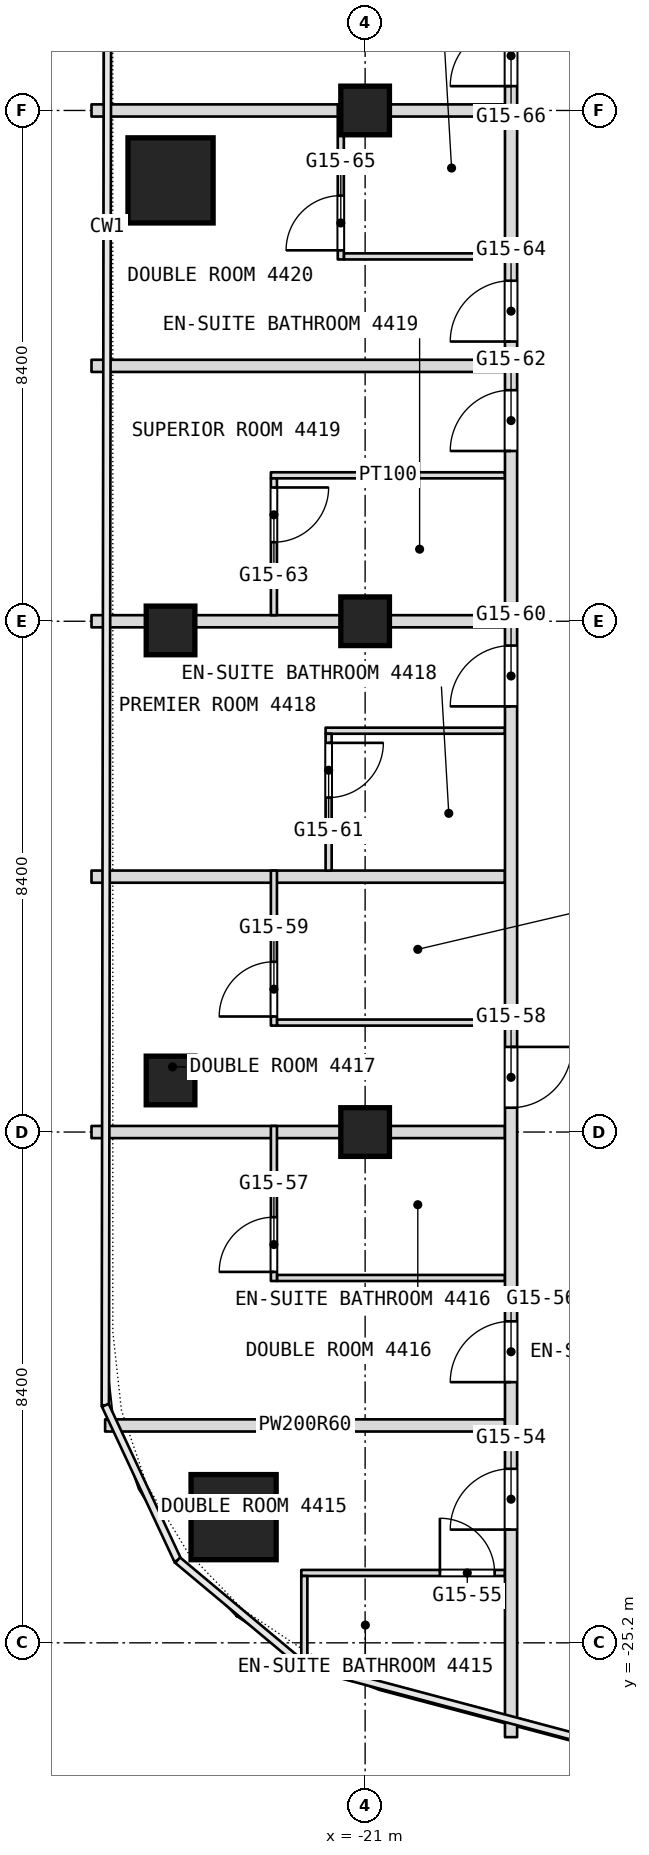
"""IFC4 building model, lengths in metres.
Left out: names, types, materials, properties, quantities, classifications, styles, units other than length and angle.
Written with IfcOpenShell. Run it as: python <this file> out.ifc"""

import sys

from ifc_helpers import new_model, si_unit, direction, frame, frame_2d, origin, origin_2d, place, context, subcontext, project, spatial, rectangle, extrude, element, fill, save


model = new_model("IFC4")
c1 = context("Model", 3, precision=1e-05, world=origin(), true_north=direction((0.0, 1.0)))
c2 = subcontext(c1, "Body", "Model", "MODEL_VIEW")
j1 = project(units=[si_unit("LENGTHUNIT", "METRE"), si_unit("PLANEANGLEUNIT", "RADIAN")], contexts=[c1])
p1 = place(None, origin())
s1 = spatial("IfcSite", under=j1, at=p1, CompositionType="ELEMENT")
p2 = place(p1, origin())
s2 = spatial("IfcBuilding", under=s1, at=p2, CompositionType="ELEMENT")
p3 = place(p2, frame((0.0, 0.0, 194.9)))
s3 = spatial("IfcBuildingStorey", under=s2, at=p3, CompositionType="ELEMENT", Elevation=194.9)
for number, where, z_axis, x_axis in (
    (1, (-23.163, -23.133, 0.0), (0.0, 0.0, 1.0), (1.0, 0.0, 0.0)),
    (2, (-24.2, -1.15, 0.0), (0.0, 0.0, 1.0), (1.0, 0.0, 0.0)),
):
    element("IfcColumn", number, at=place(p3, frame(where, z_axis=z_axis, x_axis=x_axis)), inside=s3, PredefinedType="COLUMN", context=c2, shape_type="SweptSolid", body=[
        extrude(rectangle(XDim=1.4, YDim=1.4, at=origin_2d()), origin(), (0.0, 0.0, 1.0), 3.6),
    ])
for number, where, z_axis, x_axis in (
    (3, (-21.0, -16.8, 0.0), (0.0, 0.0, 1.0), (1.0, 0.0, 0.0)),
    (4, (-21.0, -8.4, 0.0), (0.0, 0.0, 1.0), (1.0, 0.0, 0.0)),
    (5, (-21.0, 0.0, 0.0), (0.0, 0.0, 1.0), (1.0, 0.0, 0.0)),
    (6, (-24.2, -15.952, 0.0), (0.0, 0.0, 1.0), (1.0, 0.0, 0.0)),
    (7, (-24.2, -8.551, 0.0), (0.0, 0.0, 1.0), (1.0, 0.0, 0.0)),
):
    element("IfcColumn", number, at=place(p3, frame(where, z_axis=z_axis, x_axis=x_axis)), inside=s3, PredefinedType="COLUMN", context=c2, shape_type="SweptSolid", body=[
        extrude(rectangle(XDim=0.8, YDim=0.8, at=origin_2d()), origin(), (0.0, 0.0, 1.0), 3.6),
    ])
p4 = place(p3, frame((-22.05, -24.051, 0.0), z_axis=(0.0, 0.0, 1.0), x_axis=(1.0, 0.0, 0.0)))
e8 = element("IfcWall", 8, at=p4, inside=s3, PredefinedType="PARTITIONING", context=c2, shape_type="SweptSolid", body=[
    extrude(rectangle(XDim=3.35, YDim=0.1, at=frame_2d((1.675, 0.0))), origin(), (0.0, 0.0, 1.0), 3.34),
])
p5 = place(p4, frame((2.28, 0.0, 0.0)))
e9 = element("IfcOpeningElement", 9, at=p5, cuts=e8, PredefinedType="OPENING", context=c2, shape_type="SweptSolid", body=[
    extrude(rectangle(XDim=0.9, YDim=2.1, at=frame_2d((0.45, 1.05))), frame((0.0, 0.05, 0.0), z_axis=(0.0, -1.0, 0.0), x_axis=(1.0, 0.0, 0.0)), (0.0, 0.0, 1.0), 0.1),
])
p6 = place(p3, frame((-25.276, -21.625, 0.0), z_axis=(0.0, 0.0, 1.0), x_axis=(1.0, 0.0, 0.0)))
e10 = element("IfcWall", 10, at=p6, inside=s3, PredefinedType="PARTITIONING", context=c2, shape_type="SweptSolid", body=[
    extrude(rectangle(XDim=6.576, YDim=0.2, at=frame_2d((3.288, 0.0))), origin(), (0.0, 0.0, 1.0), 3.34),
])
p7 = place(p3, frame((-22.45, -19.2, 0.0), z_axis=(0.0, 0.0, 1.0), x_axis=(1.0, 0.0, 0.0)))
e11 = element("IfcWall", 11, at=p7, inside=s3, PredefinedType="PARTITIONING", context=c2, shape_type="SweptSolid", body=[
    extrude(rectangle(XDim=3.75, YDim=0.1, at=frame_2d((1.875, 0.0))), origin(), (0.0, 0.0, 1.0), 3.34),
])
p8 = place(p3, frame((-25.5, -16.8, 0.0), z_axis=(0.0, 0.0, 1.0), x_axis=(1.0, 0.0, 0.0)))
e12 = element("IfcWall", 12, at=p8, inside=s3, PredefinedType="PARTITIONING", context=c2, shape_type="SweptSolid", body=[
    extrude(rectangle(XDim=6.8, YDim=0.2, at=frame_2d((3.4, 0.0))), origin(), (0.0, 0.0, 1.0), 2.94),
])
p9 = place(p3, frame((-22.45, -15.0, 0.0), z_axis=(0.0, 0.0, 1.0), x_axis=(1.0, 0.0, 0.0)))
e13 = element("IfcWall", 13, at=p9, inside=s3, PredefinedType="PARTITIONING", context=c2, shape_type="SweptSolid", body=[
    extrude(rectangle(XDim=3.75, YDim=0.1, at=frame_2d((1.875, 0.0))), origin(), (0.0, 0.0, 1.0), 3.34),
])
p10 = place(p3, frame((-25.5, -12.6, 0.0), z_axis=(0.0, 0.0, 1.0), x_axis=(1.0, 0.0, 0.0)))
e14 = element("IfcWall", 14, at=p10, inside=s3, PredefinedType="PARTITIONING", context=c2, shape_type="SweptSolid", body=[
    extrude(rectangle(XDim=6.8, YDim=0.2, at=frame_2d((3.4, 0.0))), origin(), (0.0, 0.0, 1.0), 3.34),
])
p11 = place(p3, frame((-21.65, -10.2, 0.0), z_axis=(0.0, 0.0, 1.0), x_axis=(1.0, 0.0, 0.0)))
e15 = element("IfcWall", 15, at=p11, inside=s3, PredefinedType="PARTITIONING", context=c2, shape_type="SweptSolid", body=[
    extrude(rectangle(XDim=2.95, YDim=0.1, at=frame_2d((1.475, 0.0))), origin(), (0.0, 0.0, 1.0), 3.34),
])
p12 = place(p3, frame((-25.5, -8.4, 0.0), z_axis=(0.0, 0.0, 1.0), x_axis=(1.0, 0.0, 0.0)))
e16 = element("IfcWall", 16, at=p12, inside=s3, PredefinedType="PARTITIONING", context=c2, shape_type="SweptSolid", body=[
    extrude(rectangle(XDim=6.8, YDim=0.2, at=frame_2d((3.4, 0.0))), origin(), (0.0, 0.0, 1.0), 2.94),
])
p13 = place(p3, frame((-22.55, -6.0, 0.0), z_axis=(0.0, 0.0, 1.0), x_axis=(1.0, 0.0, 0.0)))
e17 = element("IfcWall", 17, at=p13, inside=s3, PredefinedType="PARTITIONING", context=c2, shape_type="SweptSolid", body=[
    extrude(rectangle(XDim=3.85, YDim=0.1, at=frame_2d((1.925, 0.0))), origin(), (0.0, 0.0, 1.0), 3.34),
])
p14 = place(p3, frame((-25.5, -4.2, 0.0), z_axis=(0.0, 0.0, 1.0), x_axis=(1.0, 0.0, 0.0)))
e18 = element("IfcWall", 18, at=p14, inside=s3, PredefinedType="PARTITIONING", context=c2, shape_type="SweptSolid", body=[
    extrude(rectangle(XDim=6.8, YDim=0.2, at=frame_2d((3.4, 0.0))), origin(), (0.0, 0.0, 1.0), 3.34),
])
p15 = place(p3, frame((-21.35, -2.4, 0.0), z_axis=(0.0, 0.0, 1.0), x_axis=(1.0, 0.0, 0.0)))
e19 = element("IfcWall", 19, at=p15, inside=s3, PredefinedType="PARTITIONING", context=c2, shape_type="SweptSolid", body=[
    extrude(rectangle(XDim=2.65, YDim=0.1, at=frame_2d((1.325, 0.0))), origin(), (0.0, 0.0, 1.0), 3.34),
])
p16 = place(p3, frame((-25.5, 0.0, 0.0), z_axis=(0.0, 0.0, 1.0), x_axis=(1.0, 0.0, 0.0)))
e20 = element("IfcWall", 20, at=p16, inside=s3, PredefinedType="PARTITIONING", context=c2, shape_type="SweptSolid", body=[
    extrude(rectangle(XDim=6.8, YDim=0.2, at=frame_2d((3.4, 0.0))), origin(), (0.0, 0.0, 1.0), 2.94),
])
p17 = place(p3, frame((-18.6, -26.751, 0.0), z_axis=(0.0, 0.0, 1.0), x_axis=(0.0, 1.0, 0.0)))
e21 = element("IfcWall", 21, at=p17, inside=s3, PredefinedType="PARTITIONING", context=c2, shape_type="SweptSolid", body=[
    extrude(rectangle(XDim=49.091, YDim=0.2, at=frame_2d((24.545, 0.0))), origin(), (0.0, 0.0, 1.0), 3.34),
])
p18 = place(p17, frame((3.413, 0.0, 0.0)))
e22 = element("IfcOpeningElement", 22, at=p18, cuts=e21, PredefinedType="OPENING", context=c2, shape_type="SweptSolid", body=[
    extrude(rectangle(XDim=1.0, YDim=2.1, at=frame_2d((0.5, 1.05))), frame((0.0, 0.1, 0.0), z_axis=(0.0, -1.0, 0.0), x_axis=(1.0, 0.0, 0.0)), (0.0, 0.0, 1.0), 0.2),
])
p19 = place(p17, frame((5.838, 0.0, 0.0)))
e23 = element("IfcOpeningElement", 23, at=p19, cuts=e21, PredefinedType="OPENING", context=c2, shape_type="SweptSolid", body=[
    extrude(rectangle(XDim=1.0, YDim=2.1, at=frame_2d((0.5, 1.05))), frame((0.0, 0.1, 0.0), z_axis=(0.0, -1.0, 0.0), x_axis=(1.0, 0.0, 0.0)), (0.0, 0.0, 1.0), 0.2),
])
p20 = place(p17, frame((10.351, 0.0, 0.0)))
e24 = element("IfcOpeningElement", 24, at=p20, cuts=e21, PredefinedType="OPENING", context=c2, shape_type="SweptSolid", body=[
    extrude(rectangle(XDim=1.0, YDim=2.1, at=frame_2d((0.5, 1.05))), frame((0.0, 0.1, 0.0), z_axis=(0.0, -1.0, 0.0), x_axis=(1.0, 0.0, 0.0)), (0.0, 0.0, 1.0), 0.2),
])
p21 = place(p17, frame((16.951, 0.0, 0.0)))
e25 = element("IfcOpeningElement", 25, at=p21, cuts=e21, PredefinedType="OPENING", context=c2, shape_type="SweptSolid", body=[
    extrude(rectangle(XDim=1.0, YDim=2.1, at=frame_2d((0.5, 1.05))), frame((0.0, 0.1, 0.0), z_axis=(0.0, -1.0, 0.0), x_axis=(1.0, 0.0, 0.0)), (0.0, 0.0, 1.0), 0.2),
])
p22 = place(p17, frame((21.151, 0.0, 0.0)))
e26 = element("IfcOpeningElement", 26, at=p22, cuts=e21, PredefinedType="OPENING", context=c2, shape_type="SweptSolid", body=[
    extrude(rectangle(XDim=1.0, YDim=2.1, at=frame_2d((0.5, 1.05))), frame((0.0, 0.1, 0.0), z_axis=(0.0, -1.0, 0.0), x_axis=(1.0, 0.0, 0.0)), (0.0, 0.0, 1.0), 0.2),
])
p23 = place(p17, frame((22.951, 0.0, 0.0)))
e27 = element("IfcOpeningElement", 27, at=p23, cuts=e21, PredefinedType="OPENING", context=c2, shape_type="SweptSolid", body=[
    extrude(rectangle(XDim=1.0, YDim=2.1, at=frame_2d((0.5, 1.05))), frame((0.0, 0.1, 0.0), z_axis=(0.0, -1.0, 0.0), x_axis=(1.0, 0.0, 0.0)), (0.0, 0.0, 1.0), 0.2),
])
p24 = place(p17, frame((27.151, 0.0, 0.0)))
e28 = element("IfcOpeningElement", 28, at=p24, cuts=e21, PredefinedType="OPENING", context=c2, shape_type="SweptSolid", body=[
    extrude(rectangle(XDim=1.0, YDim=2.1, at=frame_2d((0.5, 1.05))), frame((0.0, 0.1, 0.0), z_axis=(0.0, -1.0, 0.0), x_axis=(1.0, 0.0, 0.0)), (0.0, 0.0, 1.0), 0.2),
])
p25 = place(p17, frame((33.751, 0.0, 0.0)))
e29 = element("IfcOpeningElement", 29, at=p25, cuts=e21, PredefinedType="OPENING", context=c2, shape_type="SweptSolid", body=[
    extrude(rectangle(XDim=1.0, YDim=2.1, at=frame_2d((0.5, 1.05))), frame((0.0, 0.1, 0.0), z_axis=(0.0, -1.0, 0.0), x_axis=(1.0, 0.0, 0.0)), (0.0, 0.0, 1.0), 0.2),
])
p26 = place(p17, frame((37.951, 0.0, 0.0)))
e30 = element("IfcOpeningElement", 30, at=p26, cuts=e21, PredefinedType="OPENING", context=c2, shape_type="SweptSolid", body=[
    extrude(rectangle(XDim=1.0, YDim=2.1, at=frame_2d((0.5, 1.05))), frame((0.0, 0.1, 0.0), z_axis=(0.0, -1.0, 0.0), x_axis=(1.0, 0.0, 0.0)), (0.0, 0.0, 1.0), 0.2),
])
p27 = place(p17, frame((39.751, 0.0, 0.0)))
e31 = element("IfcOpeningElement", 31, at=p27, cuts=e21, PredefinedType="OPENING", context=c2, shape_type="SweptSolid", body=[
    extrude(rectangle(XDim=1.0, YDim=2.1, at=frame_2d((0.5, 1.05))), frame((0.0, 0.1, 0.0), z_axis=(0.0, -1.0, 0.0), x_axis=(1.0, 0.0, 0.0)), (0.0, 0.0, 1.0), 0.2),
])
p28 = place(p17, frame((44.051, 0.0, 0.0)))
e32 = element("IfcOpeningElement", 32, at=p28, cuts=e21, PredefinedType="OPENING", context=c2, shape_type="SweptSolid", body=[
    extrude(rectangle(XDim=1.0, YDim=2.1, at=frame_2d((0.5, 1.05))), frame((0.0, 0.1, 0.0), z_axis=(0.0, -1.0, 0.0), x_axis=(1.0, 0.0, 0.0)), (0.0, 0.0, 1.0), 0.2),
])
p29 = place(p3, frame((-21.4, -2.45, 0.0), z_axis=(0.0, 0.0, 1.0), x_axis=(0.0, 1.0, 0.0)))
e33 = element("IfcWall", 33, at=p29, inside=s3, PredefinedType="PARTITIONING", context=c2, shape_type="SweptSolid", body=[
    extrude(rectangle(XDim=2.55, YDim=0.1, at=frame_2d((1.275, 0.0))), origin(), (0.0, 0.0, 1.0), 3.34),
])
p30 = place(p29, frame((0.15, 0.0, 0.0)))
e34 = element("IfcOpeningElement", 34, at=p30, cuts=e33, PredefinedType="OPENING", context=c2, shape_type="SweptSolid", body=[
    extrude(rectangle(XDim=0.9, YDim=2.1, at=frame_2d((0.45, 1.05))), frame((0.0, 0.05, 0.0), z_axis=(0.0, -1.0, 0.0), x_axis=(1.0, 0.0, 0.0)), (0.0, 0.0, 1.0), 0.1),
])
p31 = place(p3, frame((-21.6, -12.5, 0.0), z_axis=(0.0, 0.0, 1.0), x_axis=(0.0, 1.0, 0.0)))
e35 = element("IfcWall", 35, at=p31, inside=s3, PredefinedType="PARTITIONING", context=c2, shape_type="SweptSolid", body=[
    extrude(rectangle(XDim=2.25, YDim=0.1, at=frame_2d((1.125, 0.0))), origin(), (0.0, 0.0, 1.0), 3.34),
])
p32 = place(p31, frame((1.2, 0.0, 0.0)))
e36 = element("IfcOpeningElement", 36, at=p32, cuts=e35, PredefinedType="OPENING", context=c2, shape_type="SweptSolid", body=[
    extrude(rectangle(XDim=0.9, YDim=2.1, at=frame_2d((0.45, 1.05))), frame((0.0, 0.05, 0.0), z_axis=(0.0, -1.0, 0.0), x_axis=(1.0, 0.0, 0.0)), (0.0, 0.0, 1.0), 0.1),
])
p33 = place(p3, frame((-22.0, -25.685, 0.0), z_axis=(0.0, 0.0, 1.0), x_axis=(0.0, 1.0, 0.0)))
e37 = element("IfcWall", 37, at=p33, inside=s3, PredefinedType="PARTITIONING", context=c2, shape_type="SweptSolid", body=[
    extrude(rectangle(XDim=1.584, YDim=0.1, at=frame_2d((0.792, 0.0))), origin(), (0.0, 0.0, 1.0), 3.34),
])
p34 = place(p3, frame((-22.5, -19.25, 0.0), z_axis=(0.0, 0.0, 1.0), x_axis=(0.0, 1.0, 0.0)))
e38 = element("IfcWall", 38, at=p34, inside=s3, PredefinedType="PARTITIONING", context=c2, shape_type="SweptSolid", body=[
    extrude(rectangle(XDim=2.55, YDim=0.1, at=frame_2d((1.275, 0.0))), origin(), (0.0, 0.0, 1.0), 3.34),
])
p35 = place(p34, frame((0.15, 0.0, 0.0)))
e39 = element("IfcOpeningElement", 39, at=p35, cuts=e38, PredefinedType="OPENING", context=c2, shape_type="SweptSolid", body=[
    extrude(rectangle(XDim=0.9, YDim=2.1, at=frame_2d((0.45, 1.05))), frame((0.0, 0.05, 0.0), z_axis=(0.0, -1.0, 0.0), x_axis=(1.0, 0.0, 0.0)), (0.0, 0.0, 1.0), 0.1),
])
p36 = place(p3, frame((-22.5, -15.05, 0.0), z_axis=(0.0, 0.0, 1.0), x_axis=(0.0, 1.0, 0.0)))
e40 = element("IfcWall", 40, at=p36, inside=s3, PredefinedType="PARTITIONING", context=c2, shape_type="SweptSolid", body=[
    extrude(rectangle(XDim=2.55, YDim=0.1, at=frame_2d((1.275, 0.0))), origin(), (0.0, 0.0, 1.0), 3.34),
])
p37 = place(p36, frame((0.15, 0.0, 0.0)))
e41 = element("IfcOpeningElement", 41, at=p37, cuts=e40, PredefinedType="OPENING", context=c2, shape_type="SweptSolid", body=[
    extrude(rectangle(XDim=0.9, YDim=2.1, at=frame_2d((0.45, 1.05))), frame((0.0, 0.05, 0.0), z_axis=(0.0, -1.0, 0.0), x_axis=(1.0, 0.0, 0.0)), (0.0, 0.0, 1.0), 0.1),
])
p38 = place(p3, frame((-22.5, -8.3, 0.0), z_axis=(0.0, 0.0, 1.0), x_axis=(0.0, 1.0, 0.0)))
e42 = element("IfcWall", 42, at=p38, inside=s3, PredefinedType="PARTITIONING", context=c2, shape_type="SweptSolid", body=[
    extrude(rectangle(XDim=2.25, YDim=0.1, at=frame_2d((1.125, 0.0))), origin(), (0.0, 0.0, 1.0), 3.34),
])
p39 = place(p38, frame((1.2, 0.0, 0.0)))
e43 = element("IfcOpeningElement", 43, at=p39, cuts=e42, PredefinedType="OPENING", context=c2, shape_type="SweptSolid", body=[
    extrude(rectangle(XDim=0.9, YDim=2.1, at=frame_2d((0.45, 1.05))), frame((0.0, 0.05, 0.0), z_axis=(0.0, -1.0, 0.0), x_axis=(1.0, 0.0, 0.0)), (0.0, 0.0, 1.0), 0.1),
])
p40 = place(p5, origin())
e44 = element("IfcDoor", 44, at=p40, inside=s3, OperationType="SINGLE_SWING_LEFT", PredefinedType="DOOR", context=c2, shape_type="SweptSolid", body=[
    extrude(rectangle(XDim=0.9, YDim=2.1, at=frame_2d((0.45, 1.05))), frame((0.0, 0.025, 0.0), z_axis=(0.0, -1.0, 0.0), x_axis=(1.0, 0.0, 0.0)), (0.0, 0.0, 1.0), 0.05),
])
fill(e9, e44)
p41 = place(p18, origin())
e45 = element("IfcDoor", 45, at=p41, inside=s3, OperationType="SINGLE_SWING_LEFT", PredefinedType="DOOR", context=c2, shape_type="SweptSolid", body=[
    extrude(rectangle(XDim=1.0, YDim=2.1, at=frame_2d((0.5, 1.05))), frame((0.0, 0.025, 0.0), z_axis=(0.0, -1.0, 0.0), x_axis=(1.0, 0.0, 0.0)), (0.0, 0.0, 1.0), 0.05),
])
fill(e22, e45)
p42 = place(p19, origin())
e46 = element("IfcDoor", 46, at=p42, inside=s3, OperationType="SINGLE_SWING_LEFT", PredefinedType="DOOR", context=c2, shape_type="SweptSolid", body=[
    extrude(rectangle(XDim=1.0, YDim=2.1, at=frame_2d((0.5, 1.05))), frame((0.0, 0.025, 0.0), z_axis=(0.0, -1.0, 0.0), x_axis=(1.0, 0.0, 0.0)), (0.0, 0.0, 1.0), 0.05),
])
fill(e23, e46)
p43 = place(p20, origin())
e47 = element("IfcDoor", 47, at=p43, inside=s3, OperationType="SINGLE_SWING_LEFT", PredefinedType="DOOR", context=c2, shape_type="SweptSolid", body=[
    extrude(rectangle(XDim=1.0, YDim=2.1, at=frame_2d((0.5, 1.05))), frame((0.0, 0.025, 0.0), z_axis=(0.0, -1.0, 0.0), x_axis=(1.0, 0.0, 0.0)), (0.0, 0.0, 1.0), 0.05),
])
fill(e24, e47)
p44 = place(p21, origin())
e48 = element("IfcDoor", 48, at=p44, inside=s3, OperationType="SINGLE_SWING_LEFT", PredefinedType="DOOR", context=c2, shape_type="SweptSolid", body=[
    extrude(rectangle(XDim=1.0, YDim=2.1, at=frame_2d((0.5, 1.05))), frame((0.0, 0.025, 0.0), z_axis=(0.0, -1.0, 0.0), x_axis=(1.0, 0.0, 0.0)), (0.0, 0.0, 1.0), 0.05),
])
fill(e25, e48)
p45 = place(p22, origin())
e49 = element("IfcDoor", 49, at=p45, inside=s3, OperationType="SINGLE_SWING_LEFT", PredefinedType="DOOR", context=c2, shape_type="SweptSolid", body=[
    extrude(rectangle(XDim=1.0, YDim=2.1, at=frame_2d((0.5, 1.05))), frame((0.0, 0.025, 0.0), z_axis=(0.0, -1.0, 0.0), x_axis=(1.0, 0.0, 0.0)), (0.0, 0.0, 1.0), 0.05),
])
fill(e26, e49)
p46 = place(p23, origin())
e50 = element("IfcDoor", 50, at=p46, inside=s3, OperationType="SINGLE_SWING_LEFT", PredefinedType="DOOR", context=c2, shape_type="SweptSolid", body=[
    extrude(rectangle(XDim=1.0, YDim=2.1, at=frame_2d((0.5, 1.05))), frame((0.0, 0.025, 0.0), z_axis=(0.0, -1.0, 0.0), x_axis=(1.0, 0.0, 0.0)), (0.0, 0.0, 1.0), 0.05),
])
fill(e27, e50)
p47 = place(p24, origin())
e51 = element("IfcDoor", 51, at=p47, inside=s3, OperationType="SINGLE_SWING_LEFT", PredefinedType="DOOR", context=c2, shape_type="SweptSolid", body=[
    extrude(rectangle(XDim=1.0, YDim=2.1, at=frame_2d((0.5, 1.05))), frame((0.0, 0.025, 0.0), z_axis=(0.0, -1.0, 0.0), x_axis=(1.0, 0.0, 0.0)), (0.0, 0.0, 1.0), 0.05),
])
fill(e28, e51)
p48 = place(p30, origin())
e52 = element("IfcDoor", 52, at=p48, inside=s3, OperationType="SINGLE_SWING_RIGHT", PredefinedType="DOOR", context=c2, shape_type="SweptSolid", body=[
    extrude(rectangle(XDim=0.9, YDim=2.1, at=frame_2d((0.45, 1.05))), frame((0.0, 0.025, 0.0), z_axis=(0.0, -1.0, 0.0), x_axis=(1.0, 0.0, 0.0)), (0.0, 0.0, 1.0), 0.05),
])
fill(e34, e52)
p49 = place(p32, origin())
e53 = element("IfcDoor", 53, at=p49, inside=s3, OperationType="SINGLE_SWING_LEFT", PredefinedType="DOOR", context=c2, shape_type="SweptSolid", body=[
    extrude(rectangle(XDim=0.9, YDim=2.1, at=frame_2d((0.45, 1.05))), frame((0.0, 0.025, 0.0), z_axis=(0.0, -1.0, 0.0), x_axis=(1.0, 0.0, 0.0)), (0.0, 0.0, 1.0), 0.05),
])
fill(e36, e53)
p50 = place(p35, origin())
e54 = element("IfcDoor", 54, at=p50, inside=s3, OperationType="SINGLE_SWING_RIGHT", PredefinedType="DOOR", context=c2, shape_type="SweptSolid", body=[
    extrude(rectangle(XDim=0.9, YDim=2.1, at=frame_2d((0.45, 1.05))), frame((0.0, 0.025, 0.0), z_axis=(0.0, -1.0, 0.0), x_axis=(1.0, 0.0, 0.0)), (0.0, 0.0, 1.0), 0.05),
])
fill(e39, e54)
p51 = place(p37, origin())
e55 = element("IfcDoor", 55, at=p51, inside=s3, OperationType="SINGLE_SWING_RIGHT", PredefinedType="DOOR", context=c2, shape_type="SweptSolid", body=[
    extrude(rectangle(XDim=0.9, YDim=2.1, at=frame_2d((0.45, 1.05))), frame((0.0, 0.025, 0.0), z_axis=(0.0, -1.0, 0.0), x_axis=(1.0, 0.0, 0.0)), (0.0, 0.0, 1.0), 0.05),
])
fill(e41, e55)
p52 = place(p39, origin())
e56 = element("IfcDoor", 56, at=p52, inside=s3, OperationType="SINGLE_SWING_LEFT", PredefinedType="DOOR", context=c2, shape_type="SweptSolid", body=[
    extrude(rectangle(XDim=0.9, YDim=2.1, at=frame_2d((0.45, 1.05))), frame((0.0, 0.025, 0.0), z_axis=(0.0, -1.0, 0.0), x_axis=(1.0, 0.0, 0.0)), (0.0, 0.0, 1.0), 0.05),
])
fill(e43, e56)
save(model, sys.argv[1])
